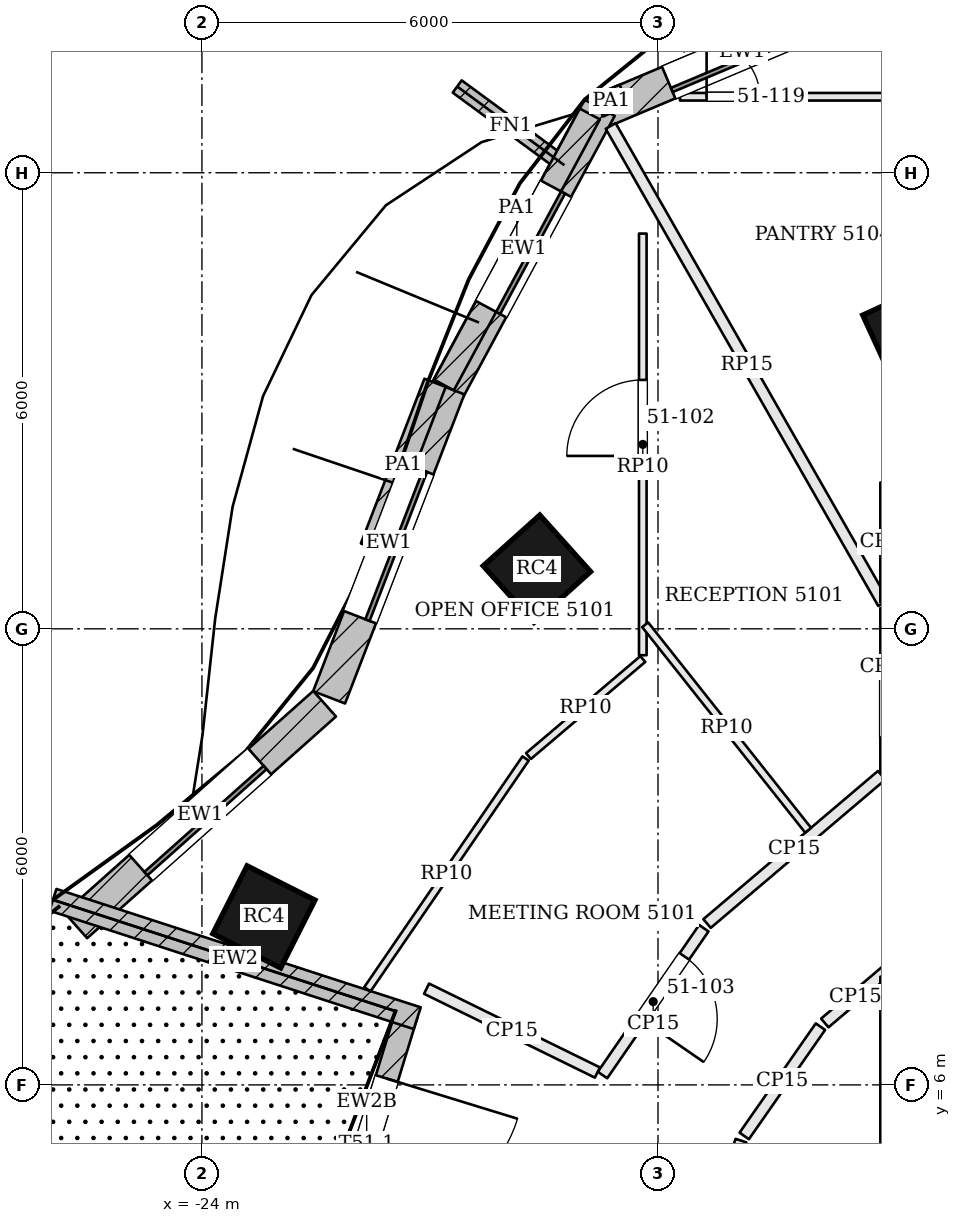
"""IFC4 building model, lengths in metres.
Left out: names, types, materials, properties, quantities, classifications, styles, units other than length and angle.
Written with IfcOpenShell. Run it as: python <this file> out.ifc"""

import sys

from ifc_helpers import new_model, si_unit, direction, frame, frame_2d, origin, origin_2d, place, context, subcontext, project, spatial, rectangle, extrude, element, fill, save


model = new_model("IFC4")
c1 = context("Model", 3, precision=1e-05, world=origin(), true_north=direction((0.0, 1.0)))
c2 = subcontext(c1, "Body", "Model", "MODEL_VIEW")
j1 = project(units=[si_unit("LENGTHUNIT", "METRE"), si_unit("PLANEANGLEUNIT", "RADIAN")], contexts=[c1])
p1 = place(None, origin())
s1 = spatial("IfcSite", under=j1, at=p1, CompositionType="ELEMENT")
p2 = place(p1, origin())
s2 = spatial("IfcBuilding", under=s1, at=p2, CompositionType="ELEMENT")
p3 = place(p2, frame((0.0, 0.0, 209.1)))
s3 = spatial("IfcBuildingStorey", under=s2, at=p3, CompositionType="ELEMENT", Elevation=209.1)
for number, where, z_axis, x_axis in (
    (1, (-14.643, 15.881, 0.0), (0.0, 0.0, 1.0), (-0.909, -0.417, 0.0)),
    (2, (-19.593, 12.79, 0.0), (0.0, 0.0, 1.0), (-0.744, -0.668, 0.0)),
    (3, (-23.185, 8.21, 0.0), (0.0, 0.0, 1.0), (-0.451, -0.893, 0.0)),
):
    element("IfcColumn", number, at=place(p3, frame(where, z_axis=z_axis, x_axis=x_axis)), inside=s3, PredefinedType="COLUMN", context=c2, shape_type="SweptSolid", body=[
        extrude(rectangle(XDim=1.0, YDim=1.0, at=origin_2d()), origin(), (0.0, 0.0, 1.0), 3.9),
    ])
p4 = place(p3, frame((-10.034, 19.259, 0.0), z_axis=(0.0, 0.0, 1.0), x_axis=(-0.974223567844, 0.225584662283, 0.0)))
e4 = element("IfcWall", 4, at=p4, inside=s3, PredefinedType="SOLIDWALL", context=c2, shape_type="SweptSolid", body=[
    extrude(rectangle(XDim=5.139, YDim=0.45, at=frame_2d((2.569, 0.0))), origin(), (0.0, 0.0, 1.0), 3.7),
])
p5 = place(p4, frame((1.519, 0.0, 0.9)))
e5 = element("IfcOpeningElement", 5, at=p5, cuts=e4, PredefinedType="OPENING", context=c2, shape_type="SweptSolid", body=[
    extrude(rectangle(XDim=2.1, YDim=2.3, at=frame_2d((1.05, 1.15))), frame((0.0, 0.235, 0.0), z_axis=(0.0, -1.0, 0.0), x_axis=(1.0, 0.0, 0.0)), (0.0, 0.0, 1.0), 0.47),
])
p6 = place(p3, frame((-14.906, 20.431, 0.0), z_axis=(0.0, 0.0, 1.0), x_axis=(-0.921435803521, -0.388530642279, 0.0)))
e6 = element("IfcWall", 6, at=p6, inside=s3, PredefinedType="SOLIDWALL", context=c2, shape_type="SweptSolid", body=[
    extrude(rectangle(XDim=4.309, YDim=0.45, at=frame_2d((2.154, 0.0))), origin(), (0.0, 0.0, 1.0), 3.7),
])
p7 = place(p6, frame((1.104, 0.0, 0.9)))
e7 = element("IfcOpeningElement", 7, at=p7, cuts=e6, PredefinedType="OPENING", context=c2, shape_type="SweptSolid", body=[
    extrude(rectangle(XDim=2.1, YDim=2.3, at=frame_2d((1.05, 1.15))), frame((0.0, 0.235, 0.0), z_axis=(0.0, -1.0, 0.0), x_axis=(1.0, 0.0, 0.0)), (0.0, 0.0, 1.0), 0.47),
])
p8 = place(p3, frame((-18.767, 18.854, 0.0), z_axis=(0.0, 0.0, 1.0), x_axis=(-0.474475888716, -0.880268499395, 0.0)))
e8 = element("IfcWall", 8, at=p8, inside=s3, PredefinedType="SOLIDWALL", context=c2, shape_type="SweptSolid", body=[
    extrude(rectangle(XDim=4.219, YDim=0.45, at=frame_2d((2.11, 0.0))), origin(), (0.0, 0.0, 1.0), 3.7),
])
p9 = place(p8, frame((1.21, 0.0, 0.9)))
e9 = element("IfcOpeningElement", 9, at=p9, cuts=e8, PredefinedType="OPENING", context=c2, shape_type="SweptSolid", body=[
    extrude(rectangle(XDim=1.8, YDim=2.3, at=frame_2d((0.9, 1.15))), frame((0.0, 0.235, 0.0), z_axis=(0.0, -1.0, 0.0), x_axis=(1.0, 0.0, 0.0)), (0.0, 0.0, 1.0), 0.47),
])
p10 = place(p3, frame((-20.757, 15.166, 0.0), z_axis=(0.0, 0.0, 1.0), x_axis=(-0.360067043581, -0.932926430179, 0.0)))
e10 = element("IfcWall", 10, at=p10, inside=s3, PredefinedType="SOLIDWALL", context=c2, shape_type="SweptSolid", body=[
    extrude(rectangle(XDim=4.36, YDim=0.45, at=frame_2d((2.18, 0.0))), origin(), (0.0, 0.0, 1.0), 3.7),
])
p11 = place(p10, frame((1.13, 0.0, 0.9)))
e11 = element("IfcOpeningElement", 11, at=p11, cuts=e10, PredefinedType="OPENING", context=c2, shape_type="SweptSolid", body=[
    extrude(rectangle(XDim=2.1, YDim=2.3, at=frame_2d((1.05, 1.15))), frame((0.0, 0.235, 0.0), z_axis=(0.0, -1.0, 0.0), x_axis=(1.0, 0.0, 0.0)), (0.0, 0.0, 1.0), 0.47),
])
p12 = place(p3, frame((-22.386, 11.014, 0.0), z_axis=(0.0, 0.0, 1.0), x_axis=(-0.746665374647, -0.665199833361, 0.0)))
e12 = element("IfcWall", 12, at=p12, inside=s3, PredefinedType="SOLIDWALL", context=c2, shape_type="SweptSolid", body=[
    extrude(rectangle(XDim=4.385, YDim=0.45, at=frame_2d((2.192, 0.0))), origin(), (0.0, 0.0, 1.0), 3.7),
])
p13 = place(p12, frame((1.142, 0.0, 0.9)))
e13 = element("IfcOpeningElement", 13, at=p13, cuts=e12, PredefinedType="OPENING", context=c2, shape_type="SweptSolid", body=[
    extrude(rectangle(XDim=2.1, YDim=2.3, at=frame_2d((1.05, 1.15))), frame((0.0, 0.235, 0.0), z_axis=(0.0, -1.0, 0.0), x_axis=(1.0, 0.0, 0.0)), (0.0, 0.0, 1.0), 0.47),
])
p14 = place(p3, frame((-21.31, 6.926, 0.0), z_axis=(0.0, 0.0, 1.0), x_axis=(-0.293609133774, -0.955925560159, 0.0)))
e14 = element("IfcWall", 14, at=p14, inside=s3, PredefinedType="SOLIDWALL", context=c2, shape_type="SweptSolid", body=[
    extrude(rectangle(XDim=3.563, YDim=0.3, at=frame_2d((1.781, 0.0))), origin(), (0.0, 0.0, 1.0), 3.7),
])
p15 = place(p14, frame((0.882, 0.0, 0.0)))
e15 = element("IfcOpeningElement", 15, at=p15, cuts=e14, PredefinedType="OPENING", context=c2, shape_type="SweptSolid", body=[
    extrude(rectangle(XDim=1.8, YDim=2.4, at=frame_2d((0.9, 1.2))), frame((0.0, 0.16, 0.0), z_axis=(0.0, -1.0, 0.0), x_axis=(1.0, 0.0, 0.0)), (0.0, 0.0, 1.0), 0.32),
])
p16 = place(p3, frame((-19.231, 18.099, 0.0), z_axis=(0.0, 0.0, 1.0), x_axis=(-0.806085538754, 0.591799040394, 0.0)))
e16 = element("IfcWall", 16, at=p16, inside=s3, PredefinedType="SOLIDWALL", context=c2, shape_type="SweptSolid", body=[
    extrude(rectangle(XDim=1.75, YDim=0.2, at=frame_2d((0.875, 0.0))), origin(), (0.0, 0.0, 1.0), 3.7),
])
p17 = place(p3, frame((-25.96, 8.435, 0.0), z_axis=(0.0, 0.0, 1.0), x_axis=(0.95101163548, -0.309155089205, 0.0)))
e17 = element("IfcWall", 17, at=p17, inside=s3, PredefinedType="SOLIDWALL", context=c2, shape_type="SweptSolid", body=[
    extrude(rectangle(XDim=5.039, YDim=0.3, at=frame_2d((2.52, 0.0))), origin(), (0.0, 0.0, 1.0), 3.204),
])
p18 = place(p3, frame((-15.891, 20.097, 3.9), z_axis=(0.0, 0.0, 1.0), x_axis=(-0.921468908678, -0.388452121038, 0.0)))
e18 = element("IfcWall", 18, at=p18, inside=s3, PredefinedType="PARAPET", context=c2, shape_type="SweptSolid", body=[
    extrude(rectangle(XDim=2.099, YDim=0.3, at=frame_2d((1.05, 0.0))), origin(), (0.0, 0.0, 1.0), 1.1),
])
p19 = place(p3, frame((-18.446, 19.02, 3.9), z_axis=(0.0, 0.0, 1.0), x_axis=(-0.921356634102, -0.388718346358, 0.0)))
e19 = element("IfcWall", 19, at=p19, inside=s3, PredefinedType="PARAPET", context=c2, shape_type="SweptSolid", body=[
    extrude(rectangle(XDim=0.363, YDim=0.3, at=frame_2d((0.182, 0.0))), origin(), (0.0, 0.0, 1.0), 1.1),
])
p20 = place(p3, frame((-18.896, 18.773, 3.9), z_axis=(0.0, 0.0, 1.0), x_axis=(-0.474444905835, -0.880285198857, 0.0)))
e20 = element("IfcWall", 20, at=p20, inside=s3, PredefinedType="PARAPET", context=c2, shape_type="SweptSolid", body=[
    extrude(rectangle(XDim=4.05, YDim=0.3, at=frame_2d((2.025, 0.0))), origin(), (0.0, 0.0, 1.0), 1.1),
])
p21 = place(p3, frame((-20.933, 15.237, 3.9), z_axis=(0.0, 0.0, 1.0), x_axis=(-0.360021038217, -0.932944184848, 0.0)))
e21 = element("IfcWall", 21, at=p21, inside=s3, PredefinedType="PARAPET", context=c2, shape_type="SweptSolid", body=[
    extrude(rectangle(XDim=2.323, YDim=0.3, at=frame_2d((1.162, 0.0))), origin(), (0.0, 0.0, 1.0), 1.1),
])
p22 = place(p3, frame((-15.0, 12.273, 0.0), z_axis=(0.0, 0.0, 1.0), x_axis=(0.0, -1.0, 0.0)))
e22 = element("IfcWall", 22, at=p22, inside=s3, PredefinedType="PARTITIONING", context=c2, shape_type="SweptSolid", body=[
    extrude(rectangle(XDim=2.151, YDim=0.15, at=frame_2d((1.076, 0.0))), origin(), (0.0, 0.0, 1.0), 3.084),
])
p23 = place(p22, frame((0.7, 0.0, 0.0)))
e23 = element("IfcOpeningElement", 23, at=p23, cuts=e22, PredefinedType="OPENING", context=c2, shape_type="SweptSolid", body=[
    extrude(rectangle(XDim=1.0, YDim=2.1, at=frame_2d((0.5, 1.05))), frame((0.0, 0.085, 0.0), z_axis=(0.0, -1.0, 0.0), x_axis=(1.0, 0.0, 0.0)), (0.0, 0.0, 1.0), 0.17),
])
p24 = place(p3, frame((-15.057, 10.073, 0.0), z_axis=(0.0, 0.0, 1.0), x_axis=(-0.762398905861, -0.647107339119, 0.0)))
e24 = element("IfcWall", 24, at=p24, inside=s3, PredefinedType="PARTITIONING", context=c2, shape_type="SweptSolid", body=[
    extrude(rectangle(XDim=3.013, YDim=0.15, at=frame_2d((1.507, 0.0))), origin(), (0.0, 0.0, 1.0), 3.084),
])
p25 = place(p3, frame((-17.397, 8.061, 0.0), z_axis=(0.0, 0.0, 1.0), x_axis=(-0.567954177421, -0.823060175413, 0.0)))
e25 = element("IfcWall", 25, at=p25, inside=s3, PredefinedType="PARTITIONING", context=c2, shape_type="SweptSolid", body=[
    extrude(rectangle(XDim=2.347, YDim=0.15, at=frame_2d((1.173, 0.0))), origin(), (0.0, 0.0, 1.0), 3.084),
])
p26 = place(p25, frame((0.45, 0.0, 0.0)))
e26 = element("IfcOpeningElement", 26, at=p26, cuts=e25, PredefinedType="OPENING", context=c2, shape_type="SweptSolid", body=[
    extrude(rectangle(XDim=1.0, YDim=2.4, at=frame_2d((0.5, 1.2))), frame((0.0, 0.085, 0.0), z_axis=(0.0, -1.0, 0.0), x_axis=(1.0, 0.0, 0.0)), (0.0, 0.0, 1.0), 0.17),
])
p27 = place(p3, frame((-18.622, 18.615, 0.0), z_axis=(0.0, 0.0, 1.0), x_axis=(0.495931620355, -0.868361576725, 0.0)))
e27 = element("IfcWall", 27, at=p27, inside=s3, PredefinedType="PARTITIONING", context=c2, shape_type="SweptSolid", body=[
    extrude(rectangle(XDim=7.229, YDim=0.15, at=frame_2d((3.615, 0.0))), origin(), (0.0, 0.0, 1.0), 3.084),
])
p28 = place(p3, frame((-21.045, 7.266, 0.0), z_axis=(0.0, 0.0, 1.0), x_axis=(0.897699172042, -0.440608892915, 0.0)))
e28 = element("IfcWall", 28, at=p28, inside=s3, PredefinedType="PARTITIONING", context=c2, shape_type="SweptSolid", body=[
    extrude(rectangle(XDim=2.503, YDim=0.15, at=frame_2d((1.252, 0.0))), origin(), (0.0, 0.0, 1.0), 3.084),
])
p29 = place(p3, frame((-15.0, 13.925, 0.0), z_axis=(0.0, 0.0, 1.0), x_axis=(0.0, -1.0, 0.0)))
e29 = element("IfcWall", 29, at=p29, inside=s3, PredefinedType="PARTITIONING", context=c2, shape_type="SweptSolid", body=[
    extrude(rectangle(XDim=1.577, YDim=0.15, at=frame_2d((0.789, 0.0))), origin(), (0.0, 0.0, 1.0), 3.084),
])
p30 = place(p3, frame((-17.739, 2.738, 0.0), z_axis=(0.0, 0.0, 1.0), x_axis=(0.311904957484, 0.950113307715, 0.0)))
e30 = element("IfcWall", 30, at=p30, inside=s3, PredefinedType="PARTITIONING", context=c2, shape_type="SweptSolid", body=[
    extrude(rectangle(XDim=2.662, YDim=0.15, at=frame_2d((1.331, 0.0))), origin(), (0.0, 0.0, 1.0), 3.084),
])
p31 = place(p3, frame((-16.865, 5.329, 0.0), z_axis=(0.0, 0.0, 1.0), x_axis=(0.572096615639, 0.820186236397, 0.0)))
e31 = element("IfcWall", 31, at=p31, inside=s3, PredefinedType="PARTITIONING", context=c2, shape_type="SweptSolid", body=[
    extrude(rectangle(XDim=1.753, YDim=0.15, at=frame_2d((0.876, 0.0))), origin(), (0.0, 0.0, 1.0), 3.084),
])
p32 = place(p3, frame((-15.805, 6.814, 0.0), z_axis=(0.0, 0.0, 1.0), x_axis=(0.762298381233, 0.647225755027, 0.0)))
e32 = element("IfcWall", 32, at=p32, inside=s3, PredefinedType="PARTITIONING", context=c2, shape_type="SweptSolid", body=[
    extrude(rectangle(XDim=1.057, YDim=0.15, at=frame_2d((0.528, 0.0))), origin(), (0.0, 0.0, 1.0), 3.084),
])
p33 = place(p3, frame((-15.0, 7.423, 0.0), z_axis=(0.0, 0.0, 1.0), x_axis=(0.0, -1.0, 0.0)))
e33 = element("IfcWall", 33, at=p33, inside=s3, PredefinedType="PARTITIONING", context=c2, shape_type="SweptSolid", body=[
    extrude(rectangle(XDim=12.423, YDim=0.15, at=frame_2d((6.211, 0.0))), origin(), (0.0, 0.0, 1.0), 3.084),
])
p34 = place(p33, frame((5.674, 0.0, 0.0)))
e34 = element("IfcOpeningElement", 34, at=p34, cuts=e33, PredefinedType="OPENING", context=c2, shape_type="SweptSolid", body=[
    extrude(rectangle(XDim=1.0, YDim=2.4, at=frame_2d((0.5, 1.2))), frame((0.0, 0.085, 0.0), z_axis=(0.0, -1.0, 0.0), x_axis=(1.0, 0.0, 0.0)), (0.0, 0.0, 1.0), 0.17),
])
p35 = place(p3, frame((-21.823, 7.258, 0.0), z_axis=(0.0, 0.0, 1.0), x_axis=(0.565413636132, 0.824807504861, 0.0)))
e35 = element("IfcWall", 35, at=p35, inside=s3, PredefinedType="PARTITIONING", context=c2, shape_type="SweptSolid", body=[
    extrude(rectangle(XDim=3.681, YDim=0.1, at=frame_2d((1.84, 0.0))), origin(), (0.0, 0.0, 1.0), 3.084),
])
p36 = place(p3, frame((-19.704, 10.326, 0.0), z_axis=(0.0, 0.0, 1.0), x_axis=(0.762375886238, 0.647134459044, 0.0)))
e36 = element("IfcWall", 36, at=p36, inside=s3, PredefinedType="PARTITIONING", context=c2, shape_type="SweptSolid", body=[
    extrude(rectangle(XDim=1.972, YDim=0.1, at=frame_2d((0.986, 0.0))), origin(), (0.0, 0.0, 1.0), 3.084),
])
p37 = place(p3, frame((-18.2, 11.653, 0.0), z_axis=(0.0, 0.0, 1.0), x_axis=(0.0, 1.0, 0.0)))
e37 = element("IfcWall", 37, at=p37, inside=s3, PredefinedType="PARTITIONING", context=c2, shape_type="SweptSolid", body=[
    extrude(rectangle(XDim=5.547, YDim=0.1, at=frame_2d((2.774, 0.0))), origin(), (0.0, 0.0, 1.0), 3.084),
])
p38 = place(p37, frame((2.622, 0.0, 0.0)))
e38 = element("IfcOpeningElement", 38, at=p38, cuts=e37, PredefinedType="OPENING", context=c2, shape_type="SweptSolid", body=[
    extrude(rectangle(XDim=1.0, YDim=2.1, at=frame_2d((0.5, 1.05))), frame((0.0, 0.06, 0.0), z_axis=(0.0, -1.0, 0.0), x_axis=(1.0, 0.0, 0.0)), (0.0, 0.0, 1.0), 0.12),
])
p39 = place(p3, frame((-16.025, 9.35, 0.0), z_axis=(0.0, 0.0, 1.0), x_axis=(-0.621358765416, 0.783526186315, 0.0)))
e39 = element("IfcWall", 39, at=p39, inside=s3, PredefinedType="PARTITIONING", context=c2, shape_type="SweptSolid", body=[
    extrude(rectangle(XDim=3.451, YDim=0.1, at=frame_2d((1.725, 0.0))), origin(), (0.0, 0.0, 1.0), 3.084),
])
p40 = place(p3, frame((-17.71, 19.0, 0.0), z_axis=(0.0, 0.0, 1.0), x_axis=(1.0, 0.0, 0.0)))
e40 = element("IfcWall", 40, at=p40, inside=s3, PredefinedType="PARTITIONING", context=c2, shape_type="SweptSolid", body=[
    extrude(rectangle(XDim=7.968, YDim=0.1, at=frame_2d((3.984, 0.0))), origin(), (0.0, 0.0, 1.0), 3.084),
])
p41 = place(p40, frame((0.35, 0.0, 0.0)))
e41 = element("IfcOpeningElement", 41, at=p41, cuts=e40, PredefinedType="OPENING", context=c2, shape_type="SweptSolid", body=[
    extrude(rectangle(XDim=0.7, YDim=2.1, at=frame_2d((0.35, 1.05))), frame((0.0, 0.06, 0.0), z_axis=(0.0, -1.0, 0.0), x_axis=(1.0, 0.0, 0.0)), (0.0, 0.0, 1.0), 0.12),
])
p42 = place(p40, frame((3.55, 0.0, 0.0)))
e42 = element("IfcOpeningElement", 42, at=p42, cuts=e40, PredefinedType="OPENING", context=c2, shape_type="SweptSolid", body=[
    extrude(rectangle(XDim=0.9, YDim=2.1, at=frame_2d((0.45, 1.05))), frame((0.0, 0.06, 0.0), z_axis=(0.0, -1.0, 0.0), x_axis=(1.0, 0.0, 0.0)), (0.0, 0.0, 1.0), 0.12),
])
p43 = place(p7, origin())
e43 = element("IfcWindow", 43, at=p43, inside=s3, PartitioningType="SINGLE_PANEL", PredefinedType="WINDOW", context=c2, shape_type="SweptSolid", body=[
    extrude(rectangle(XDim=2.1, YDim=2.3, at=frame_2d((1.05, 1.15))), frame((0.0, 0.135, 0.0), z_axis=(0.0, -1.0, 0.0), x_axis=(1.0, 0.0, 0.0)), (0.0, 0.0, 1.0), 0.06),
])
fill(e7, e43)
p44 = place(p9, origin())
e44 = element("IfcWindow", 44, at=p44, inside=s3, PartitioningType="SINGLE_PANEL", PredefinedType="WINDOW", context=c2, shape_type="SweptSolid", body=[
    extrude(rectangle(XDim=1.8, YDim=2.3, at=frame_2d((0.9, 1.15))), frame((0.0, 0.135, 0.0), z_axis=(0.0, -1.0, 0.0), x_axis=(1.0, 0.0, 0.0)), (0.0, 0.0, 1.0), 0.06),
])
fill(e9, e44)
p45 = place(p11, origin())
e45 = element("IfcWindow", 45, at=p45, inside=s3, PartitioningType="SINGLE_PANEL", PredefinedType="WINDOW", context=c2, shape_type="SweptSolid", body=[
    extrude(rectangle(XDim=2.1, YDim=2.3, at=frame_2d((1.05, 1.15))), frame((0.0, 0.135, 0.0), z_axis=(0.0, -1.0, 0.0), x_axis=(1.0, 0.0, 0.0)), (0.0, 0.0, 1.0), 0.06),
])
fill(e11, e45)
p46 = place(p13, origin())
e46 = element("IfcWindow", 46, at=p46, inside=s3, PartitioningType="SINGLE_PANEL", PredefinedType="WINDOW", context=c2, shape_type="SweptSolid", body=[
    extrude(rectangle(XDim=2.1, YDim=2.3, at=frame_2d((1.05, 1.15))), frame((0.0, 0.135, 0.0), z_axis=(0.0, -1.0, 0.0), x_axis=(1.0, 0.0, 0.0)), (0.0, 0.0, 1.0), 0.06),
])
fill(e13, e46)
p47 = place(p15, origin())
e47 = element("IfcDoor", 47, at=p47, inside=s3, OperationType="DOUBLE_DOOR_DOUBLE_SWING", PredefinedType="DOOR", context=c2, shape_type="SweptSolid", body=[
    extrude(rectangle(XDim=1.8, YDim=2.4, at=frame_2d((0.9, 1.2))), frame((0.0, 0.025, 0.0), z_axis=(0.0, -1.0, 0.0), x_axis=(1.0, 0.0, 0.0)), (0.0, 0.0, 1.0), 0.05),
])
fill(e15, e47)
p48 = place(p38, origin())
e48 = element("IfcDoor", 48, at=p48, inside=s3, OperationType="SINGLE_SWING_LEFT", PredefinedType="DOOR", context=c2, shape_type="SweptSolid", body=[
    extrude(rectangle(XDim=1.0, YDim=2.1, at=frame_2d((0.5, 1.05))), frame((0.0, 0.025, 0.0), z_axis=(0.0, -1.0, 0.0), x_axis=(1.0, 0.0, 0.0)), (0.0, 0.0, 1.0), 0.05),
])
fill(e38, e48)
p49 = place(p26, origin())
e49 = element("IfcDoor", 49, at=p49, inside=s3, OperationType="SINGLE_SWING_RIGHT", PredefinedType="DOOR", context=c2, shape_type="SweptSolid", body=[
    extrude(rectangle(XDim=1.0, YDim=2.4, at=frame_2d((0.5, 1.2))), frame((0.0, 0.025, 0.0), z_axis=(0.0, -1.0, 0.0), x_axis=(1.0, 0.0, 0.0)), (0.0, 0.0, 1.0), 0.05),
])
fill(e26, e49)
p50 = place(p41, origin())
e50 = element("IfcDoor", 50, at=p50, inside=s3, OperationType="SINGLE_SWING_LEFT", PredefinedType="DOOR", context=c2, shape_type="SweptSolid", body=[
    extrude(rectangle(XDim=0.7, YDim=2.1, at=frame_2d((0.35, 1.05))), frame((0.0, 0.025, 0.0), z_axis=(0.0, -1.0, 0.0), x_axis=(1.0, 0.0, 0.0)), (0.0, 0.0, 1.0), 0.05),
])
fill(e41, e50)
save(model, sys.argv[1])
